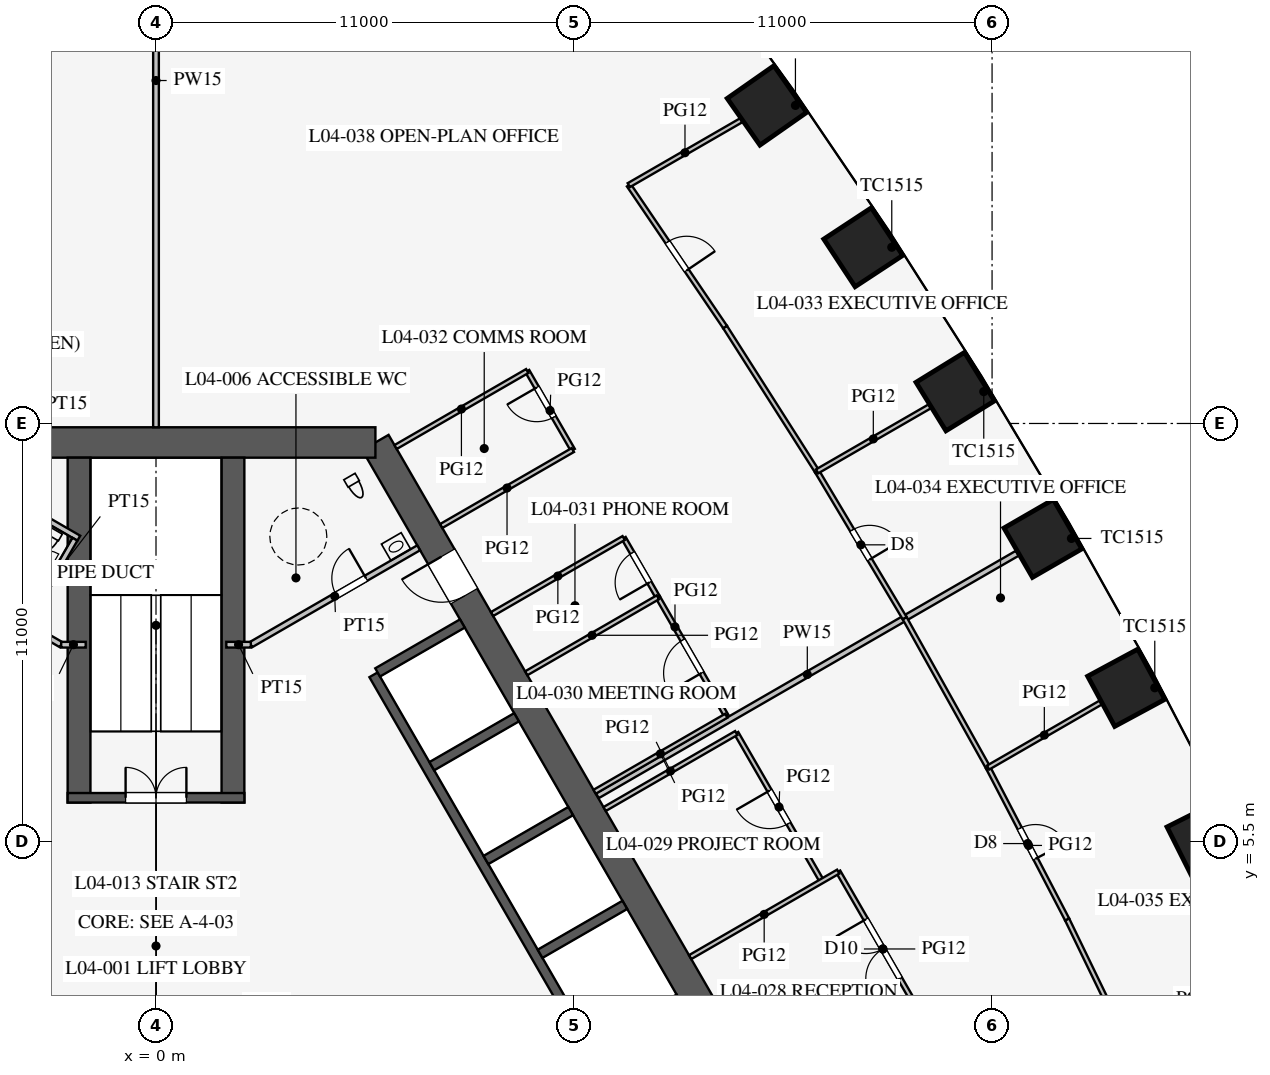
"""IFC4 building model, lengths in metres.
Left out: names, types, materials, properties, quantities, classifications, styles, units other than length and angle.
Written with IfcOpenShell. Run it as: python <this file> out.ifc"""

import sys

from ifc_helpers import new_model, si_unit, direction, frame, frame_2d, origin, origin_2d, place, context, subcontext, project, spatial, rectangle, extrude, element, fill, save


model = new_model("IFC4")
c1 = context("Model", 3, precision=1e-05, world=origin(), true_north=direction((0.0, 1.0)))
c2 = subcontext(c1, "Body", "Model", "MODEL_VIEW")
j1 = project(units=[si_unit("LENGTHUNIT", "METRE"), si_unit("PLANEANGLEUNIT", "RADIAN")], contexts=[c1])
p1 = place(None, origin())
s1 = spatial("IfcSite", under=j1, at=p1, CompositionType="ELEMENT")
p2 = place(p1, origin())
s2 = spatial("IfcBuilding", under=s1, at=p2, CompositionType="ELEMENT")
p3 = place(p2, frame((0.0, 0.0, 20.7)))
s3 = spatial("IfcBuildingStorey", under=s2, at=p3, CompositionType="ELEMENT", Elevation=20.7)
for number, where, z_axis, x_axis in (
    (1, (27.611, 5.549, 0.0), (0.0, 0.0, 1.0), (-0.449, 0.894, 0.0)),
    (2, (25.531, 9.544, 0.0), (0.0, 0.0, 1.0), (-0.475, 0.88, 0.0)),
    (3, (23.338, 13.474, 0.0), (0.0, 0.0, 1.0), (-0.5, 0.866, 0.0)),
    (4, (21.031, 17.339, 0.0), (0.0, 0.0, 1.0), (-0.525, 0.851, 0.0)),
    (5, (18.611, 21.137, 0.0), (0.0, 0.0, 1.0), (-0.549, 0.836, 0.0)),
    (6, (16.076, 24.87, 0.0), (0.0, 0.0, 1.0), (-0.574, 0.819, 0.0)),
):
    element("IfcColumn", number, at=place(p3, frame(where, z_axis=z_axis, x_axis=x_axis)), inside=s3, PredefinedType="COLUMN", context=c2, shape_type="SweptSolid", body=[
        extrude(rectangle(XDim=1.5, YDim=1.5, at=origin_2d()), origin(), (0.0, 0.0, 1.0), 4.2),
    ])
p4 = place(p3, frame((16.743, -3.0, 0.0), z_axis=(0.0, 0.0, 1.0), x_axis=(-0.500002442456, 0.866023993627, 0.0)))
e7 = element("IfcWall", 7, at=p4, inside=s3, PredefinedType="SHEAR", context=c2, shape_type="SweptSolid", body=[
    extrude(rectangle(XDim=21.939, YDim=0.8, at=frame_2d((10.97, 0.0))), origin(), (0.0, 0.0, 1.0), 4.2),
])
p5 = place(p4, frame((17.27, 0.0, 0.0)))
e8 = element("IfcOpeningElement", 8, at=p5, cuts=e7, PredefinedType="OPENING", context=c2, shape_type="SweptSolid", body=[
    extrude(rectangle(XDim=1.2, YDim=2.1, at=frame_2d((0.6, 1.05))), frame((0.0, 0.41, 0.0), z_axis=(0.0, -1.0, 0.0), x_axis=(1.0, 0.0, 0.0)), (0.0, 0.0, 1.0), 0.82),
])
p6 = place(p4, frame((3.47, 0.0, 0.0)))
e9 = element("IfcOpeningElement", 9, at=p6, cuts=e7, PredefinedType="OPENING", context=c2, shape_type="SweptSolid", body=[
    extrude(rectangle(XDim=1.2, YDim=2.1, at=frame_2d((0.6, 1.05))), frame((0.0, 0.41, 0.0), z_axis=(0.0, -1.0, 0.0), x_axis=(1.0, 0.0, 0.0)), (0.0, 0.0, 1.0), 0.82),
])
p7 = place(p3, frame((5.773, 16.0, 0.0), z_axis=(0.0, 0.0, 1.0), x_axis=(-1.0, 0.0, 0.0)))
e10 = element("IfcWall", 10, at=p7, inside=s3, PredefinedType="SHEAR", context=c2, shape_type="SweptSolid", body=[
    extrude(rectangle(XDim=11.547, YDim=0.8, at=frame_2d((5.773, 0.0))), origin(), (0.0, 0.0, 1.0), 4.2),
])
p8 = place(p3, frame((11.424, 0.014, 0.0), z_axis=(0.0, 0.0, 1.0), x_axis=(-0.500001763848, 0.866024385424, 0.0)))
e11 = element("IfcWall", 11, at=p8, inside=s3, PredefinedType="SHEAR", context=c2, shape_type="SweptSolid", body=[
    extrude(rectangle(XDim=11.4, YDim=0.25, at=frame_2d((5.7, 0.0))), origin(), (0.0, 0.0, 1.0), 4.2),
])
for number, where, z_axis, x_axis in (
    (12, (11.532, 0.076, 0.0), (0.0, 0.0, 1.0), (0.866, 0.5, 0.0)),
    (13, (10.107, 2.544, 0.0), (0.0, 0.0, 1.0), (0.866, 0.5, 0.0)),
    (14, (8.682, 5.012, 0.0), (0.0, 0.0, 1.0), (0.866, 0.5, 0.0)),
    (15, (7.257, 7.481, 0.0), (0.0, 0.0, 1.0), (0.866, 0.5, 0.0)),
):
    element("IfcWall", number, at=place(p3, frame(where, z_axis=z_axis, x_axis=x_axis)), inside=s3, PredefinedType="SHEAR", context=c2, shape_type="SweptSolid", body=[
        extrude(rectangle(XDim=2.575, YDim=0.25, at=frame_2d((1.288, 0.0))), origin(), (0.0, 0.0, 1.0), 4.2),
    ])
p9 = place(p3, frame((5.832, 9.949, 0.0), z_axis=(0.0, 0.0, 1.0), x_axis=(0.866029291668, 0.499993265928, 0.0)))
e16 = element("IfcWall", 16, at=p9, inside=s3, PredefinedType="SHEAR", context=c2, shape_type="SweptSolid", body=[
    extrude(rectangle(XDim=2.575, YDim=0.25, at=frame_2d((1.288, 0.0))), origin(), (0.0, 0.0, 1.0), 4.2),
])
for number, where, z_axis, x_axis in (
    (17, (2.025, 6.525, 0.0), (0.0, 0.0, 1.0), (0.0, 1.0, 0.0)),
    (18, (-2.025, 6.525, 0.0), (0.0, 0.0, 1.0), (0.0, 1.0, 0.0)),
):
    element("IfcWall", number, at=place(p3, frame(where, z_axis=z_axis, x_axis=x_axis)), inside=s3, PredefinedType="SHEAR", context=c2, shape_type="SweptSolid", body=[
        extrude(rectangle(XDim=9.075, YDim=0.6, at=frame_2d((4.538, 0.0))), origin(), (0.0, 0.0, 1.0), 4.2),
    ])
p10 = place(p3, frame((2.325, 6.65, 0.0), z_axis=(0.0, 0.0, 1.0), x_axis=(-1.0, 0.0, 0.0)))
e19 = element("IfcWall", 19, at=p10, inside=s3, PredefinedType="SHEAR", context=c2, shape_type="SweptSolid", body=[
    extrude(rectangle(XDim=4.65, YDim=0.25, at=frame_2d((2.325, 0.0))), origin(), (0.0, 0.0, 1.0), 4.2),
])
p11 = place(p10, frame((1.525, 0.0, 0.0)))
e20 = element("IfcOpeningElement", 20, at=p11, cuts=e19, PredefinedType="OPENING", context=c2, shape_type="SweptSolid", body=[
    extrude(rectangle(XDim=1.6, YDim=2.1, at=frame_2d((0.8, 1.05))), frame((0.0, 0.135, 0.0), z_axis=(0.0, -1.0, 0.0), x_axis=(1.0, 0.0, 0.0)), (0.0, 0.0, 1.0), 0.27),
])
p12 = place(p3, frame((2.495, 10.678, 0.0), z_axis=(0.0, 0.0, 1.0), x_axis=(0.86602216432, 0.500005610874, 0.0)))
e21 = element("IfcWall", 21, at=p12, inside=s3, PredefinedType="PARTITIONING", context=c2, shape_type="SweptSolid", body=[
    extrude(rectangle(XDim=5.1, YDim=0.15, at=frame_2d((2.55, 0.0))), origin(), (0.0, 0.0, 1.0), 4.0),
])
p13 = place(p12, frame((2.6, 0.0, 0.0)))
e22 = element("IfcOpeningElement", 22, at=p13, cuts=e21, PredefinedType="OPENING", context=c2, shape_type="SweptSolid", body=[
    extrude(rectangle(XDim=0.9, YDim=2.1, at=frame_2d((0.45, 1.05))), frame((0.0, 0.085, 0.0), z_axis=(0.0, -1.0, 0.0), x_axis=(1.0, 0.0, 0.0)), (0.0, 0.0, 1.0), 0.17),
])
p14 = place(p3, frame((-2.495, 10.678, 0.0), z_axis=(0.0, 0.0, 1.0), x_axis=(-0.86602216432, 0.500005610874, 0.0)))
e23 = element("IfcWall", 23, at=p14, inside=s3, PredefinedType="PARTITIONING", context=c2, shape_type="SweptSolid", body=[
    extrude(rectangle(XDim=5.1, YDim=0.15, at=frame_2d((2.55, 0.0))), origin(), (0.0, 0.0, 1.0), 4.0),
])
p15 = place(p14, frame((2.6, 0.0, 0.0)))
e24 = element("IfcOpeningElement", 24, at=p15, cuts=e23, PredefinedType="OPENING", context=c2, shape_type="SweptSolid", body=[
    extrude(rectangle(XDim=0.9, YDim=2.1, at=frame_2d((0.45, 1.05))), frame((0.0, 0.085, 0.0), z_axis=(0.0, -1.0, 0.0), x_axis=(1.0, 0.0, 0.0)), (0.0, 0.0, 1.0), 0.17),
])
for number, where, z_axis, x_axis in (
    (25, (2.495, 10.678, 0.0), (0.0, 0.0, 1.0), (-1.0, 0.0, 0.0)),
    (26, (-2.495, 10.678, 0.0), (0.0, 0.0, 1.0), (1.0, 0.0, 0.0)),
):
    element("IfcWall", number, at=place(p3, frame(where, z_axis=z_axis, x_axis=x_axis)), inside=s3, PredefinedType="PARTITIONING", context=c2, shape_type="SweptSolid", body=[
        extrude(rectangle(XDim=0.645, YDim=0.15, at=frame_2d((0.323, 0.0))), origin(), (0.0, 0.0, 1.0), 4.0),
    ])
p16 = place(p3, frame((-2.031, 13.482, 0.0), z_axis=(0.0, 0.0, 1.0), x_axis=(-0.866050731258, 0.499956128963, 0.0)))
e27 = element("IfcWall", 27, at=p16, inside=s3, PredefinedType="PARTITIONING", context=c2, shape_type="SweptSolid", body=[
    extrude(rectangle(XDim=4.1, YDim=0.15, at=frame_2d((2.05, 0.0))), origin(), (0.0, 0.0, 1.0), 4.0),
])
p17 = place(p3, frame((-3.389, 11.281, 0.0), z_axis=(0.0, 0.0, 1.0), x_axis=(0.499989096993, 0.866031698547, 0.0)))
e28 = element("IfcWall", 28, at=p17, inside=s3, PredefinedType="PARTITIONING", context=c2, shape_type="SweptSolid", body=[
    extrude(rectangle(XDim=2.51, YDim=0.15, at=frame_2d((1.255, 0.0))), origin(), (0.0, 0.0, 1.0), 4.0),
])
p18 = place(p3, frame((0.0, 16.4, 0.0), z_axis=(0.0, 0.0, 1.0), x_axis=(0.0, 1.0, 0.0)))
e29 = element("IfcWall", 29, at=p18, inside=s3, PredefinedType="PARTITIONING", context=c2, shape_type="SweptSolid", body=[
    extrude(rectangle(XDim=18.25, YDim=0.15, at=frame_2d((9.125, 0.0))), origin(), (0.0, 0.0, 1.0), 2.3),
])
p19 = place(p3, frame((11.613, 6.705, 0.0), z_axis=(0.0, 0.0, 1.0), x_axis=(0.86602785495, 0.499995754432, 0.0)))
e30 = element("IfcWall", 30, at=p19, inside=s3, PredefinedType="PARTITIONING", context=c2, shape_type="SweptSolid", body=[
    extrude(rectangle(XDim=12.759, YDim=0.15, at=frame_2d((6.379, 0.0))), origin(), (0.0, 0.0, 1.0), 3.2),
])
p20 = place(p3, frame((15.006, 8.808, 0.0), z_axis=(0.0, 0.0, 1.0), x_axis=(-0.500012057535, 0.866018442252, 0.0)))
e31 = element("IfcWall", 31, at=p20, inside=s3, PredefinedType="PARTITIONING", context=c2, shape_type="SweptSolid", body=[
    extrude(rectangle(XDim=3.6, YDim=0.12, at=frame_2d((1.8, 0.0))), origin(), (0.0, 0.0, 1.0), 2.9),
])
p21 = place(p20, frame((1.3, 0.0, 0.15)))
e32 = element("IfcOpeningElement", 32, at=p21, cuts=e31, PredefinedType="OPENING", context=c2, shape_type="SweptSolid", body=[
    extrude(rectangle(XDim=1.0, YDim=2.1, at=frame_2d((0.5, 1.05))), frame((0.0, 0.07, 0.0), z_axis=(0.0, -1.0, 0.0), x_axis=(1.0, 0.0, 0.0)), (0.0, 0.0, 1.0), 0.14),
])
p22 = place(p3, frame((13.206, 11.926, 0.0), z_axis=(0.0, 0.0, 1.0), x_axis=(-0.499961193289, 0.866047807691, 0.0)))
e33 = element("IfcWall", 33, at=p22, inside=s3, PredefinedType="PARTITIONING", context=c2, shape_type="SweptSolid", body=[
    extrude(rectangle(XDim=1.8, YDim=0.12, at=frame_2d((0.9, 0.0))), origin(), (0.0, 0.0, 1.0), 2.9),
])
p23 = place(p22, frame((0.45, 0.0, 0.15)))
e34 = element("IfcOpeningElement", 34, at=p23, cuts=e33, PredefinedType="OPENING", context=c2, shape_type="SweptSolid", body=[
    extrude(rectangle(XDim=0.9, YDim=2.1, at=frame_2d((0.45, 1.05))), frame((0.0, 0.07, 0.0), z_axis=(0.0, -1.0, 0.0), x_axis=(1.0, 0.0, 0.0)), (0.0, 0.0, 1.0), 0.14),
])
p24 = place(p3, frame((10.969, 15.802, 0.0), z_axis=(0.0, 0.0, 1.0), x_axis=(-0.500001309137, 0.866024647952, 0.0)))
e35 = element("IfcWall", 35, at=p24, inside=s3, PredefinedType="PARTITIONING", context=c2, shape_type="SweptSolid", body=[
    extrude(rectangle(XDim=2.4, YDim=0.12, at=frame_2d((1.2, 0.0))), origin(), (0.0, 0.0, 1.0), 2.9),
])
p25 = place(p24, frame((1.0, 0.0, 0.15)))
e36 = element("IfcOpeningElement", 36, at=p25, cuts=e35, PredefinedType="OPENING", context=c2, shape_type="SweptSolid", body=[
    extrude(rectangle(XDim=0.9, YDim=2.1, at=frame_2d((0.45, 1.05))), frame((0.0, 0.07, 0.0), z_axis=(0.0, -1.0, 0.0), x_axis=(1.0, 0.0, 0.0)), (0.0, 0.0, 1.0), 0.14),
])
p26 = place(p3, frame((17.519, 4.457, 0.0), z_axis=(0.0, 0.0, 1.0), x_axis=(-0.500013631625, 0.866017533419, 0.0)))
e37 = element("IfcWall", 37, at=p26, inside=s3, PredefinedType="PARTITIONING", context=c2, shape_type="SweptSolid", body=[
    extrude(rectangle(XDim=4.5, YDim=0.12, at=frame_2d((2.25, 0.0))), origin(), (0.0, 0.0, 1.0), 2.9),
])
p27 = place(p26, frame((1.75, 0.0, 0.15)))
e38 = element("IfcOpeningElement", 38, at=p27, cuts=e37, PredefinedType="OPENING", context=c2, shape_type="SweptSolid", body=[
    extrude(rectangle(XDim=1.0, YDim=2.1, at=frame_2d((0.5, 1.05))), frame((0.0, 0.07, 0.0), z_axis=(0.0, -1.0, 0.0), x_axis=(1.0, 0.0, 0.0)), (0.0, 0.0, 1.0), 0.14),
])
p28 = place(p3, frame((20.302, 0.636, 0.0), z_axis=(0.0, 0.0, 1.0), x_axis=(-0.499977259774, 0.866038532462, 0.0)))
e39 = element("IfcWall", 39, at=p28, inside=s3, PredefinedType="PARTITIONING", context=c2, shape_type="SweptSolid", body=[
    extrude(rectangle(XDim=4.7, YDim=0.12, at=frame_2d((2.35, 0.0))), origin(), (0.0, 0.0, 1.0), 2.9),
])
p29 = place(p28, frame((1.45, 0.0, 0.15)))
e40 = element("IfcOpeningElement", 40, at=p29, cuts=e39, PredefinedType="OPENING", context=c2, shape_type="SweptSolid", body=[
    extrude(rectangle(XDim=1.8, YDim=2.1, at=frame_2d((0.9, 1.05))), frame((0.0, 0.07, 0.0), z_axis=(0.0, -1.0, 0.0), x_axis=(1.0, 0.0, 0.0)), (0.0, 0.0, 1.0), 0.14),
])
for number, where, z_axis, x_axis in (
    (41, (11.542, 6.808, 0.0), (0.0, 0.0, 1.0), (0.866, 0.5, 0.0)),
    (42, (6.305, 15.88, 0.0), (0.0, 0.0, 1.0), (0.866, 0.5, 0.0)),
    (43, (9.742, 9.926, 0.0), (0.0, 0.0, 1.0), (0.866, 0.5, 0.0)),
    (44, (8.842, 11.485, 0.0), (0.0, 0.0, 1.0), (0.866, 0.5, 0.0)),
    (45, (7.505, 13.802, 0.0), (0.0, 0.0, 1.0), (0.866, 0.5, 0.0)),
    (46, (11.805, 6.354, 0.0), (0.0, 0.0, 1.0), (0.866, 0.5, 0.0)),
):
    element("IfcWall", number, at=place(p3, frame(where, z_axis=z_axis, x_axis=x_axis)), inside=s3, PredefinedType="PARTITIONING", context=c2, shape_type="SweptSolid", body=[
        extrude(rectangle(XDim=4.0, YDim=0.12, at=frame_2d((2.0, 0.0))), origin(), (0.0, 0.0, 1.0), 2.9),
    ])
p30 = place(p3, frame((14.055, 2.457, 0.0), z_axis=(0.0, 0.0, 1.0), x_axis=(0.866031096941, 0.499990139034, 0.0)))
e47 = element("IfcWall", 47, at=p30, inside=s3, PredefinedType="PARTITIONING", context=c2, shape_type="SweptSolid", body=[
    extrude(rectangle(XDim=4.5, YDim=0.12, at=frame_2d((2.25, 0.0))), origin(), (0.0, 0.0, 1.0), 2.9),
])
p31 = place(p3, frame((19.701, 11.374, 0.0), z_axis=(0.0, 0.0, 1.0), x_axis=(-0.512483962191, 0.858696796604, 0.0)))
e48 = element("IfcWall", 48, at=p31, inside=s3, PredefinedType="PARTITIONING", context=c2, shape_type="SweptSolid", body=[
    extrude(rectangle(XDim=4.5, YDim=0.12, at=frame_2d((2.25, 0.0))), origin(), (0.0, 0.0, 1.0), 2.9),
])
p32 = place(p31, frame((1.8, 0.0, 0.15)))
e49 = element("IfcOpeningElement", 49, at=p32, cuts=e48, PredefinedType="OPENING", context=c2, shape_type="SweptSolid", body=[
    extrude(rectangle(XDim=0.9, YDim=2.1, at=frame_2d((0.45, 1.05))), frame((0.0, 0.07, 0.0), z_axis=(0.0, -1.0, 0.0), x_axis=(1.0, 0.0, 0.0)), (0.0, 0.0, 1.0), 0.14),
])
p33 = place(p3, frame((17.395, 15.239, 0.0), z_axis=(0.0, 0.0, 1.0), x_axis=(-0.537243691336, 0.843427066272, 0.0)))
e50 = element("IfcWall", 50, at=p33, inside=s3, PredefinedType="PARTITIONING", context=c2, shape_type="SweptSolid", body=[
    extrude(rectangle(XDim=4.504, YDim=0.12, at=frame_2d((2.252, 0.0))), origin(), (0.0, 0.0, 1.0), 2.9),
])
p34 = place(p3, frame((14.975, 19.038, 0.0), z_axis=(0.0, 0.0, 1.0), x_axis=(-0.561512004239, 0.827468591002, 0.0)))
e51 = element("IfcWall", 51, at=p34, inside=s3, PredefinedType="PARTITIONING", context=c2, shape_type="SweptSolid", body=[
    extrude(rectangle(XDim=4.512, YDim=0.12, at=frame_2d((2.256, 0.0))), origin(), (0.0, 0.0, 1.0), 2.9),
])
p35 = place(p34, frame((1.8, 0.0, 0.15)))
e52 = element("IfcOpeningElement", 52, at=p35, cuts=e51, PredefinedType="OPENING", context=c2, shape_type="SweptSolid", body=[
    extrude(rectangle(XDim=0.9, YDim=2.1, at=frame_2d((0.45, 1.05))), frame((0.0, 0.07, 0.0), z_axis=(0.0, -1.0, 0.0), x_axis=(1.0, 0.0, 0.0)), (0.0, 0.0, 1.0), 0.14),
])
p36 = place(p3, frame((25.941, -0.611, 0.0), z_axis=(0.0, 0.0, 1.0), x_axis=(-0.435857917556, 0.900015486369, 0.0)))
e53 = element("IfcWall", 53, at=p36, inside=s3, PredefinedType="PARTITIONING", context=c2, shape_type="SweptSolid", body=[
    extrude(rectangle(XDim=4.512, YDim=0.12, at=frame_2d((2.256, 0.0))), origin(), (0.0, 0.0, 1.0), 2.9),
])
p37 = place(p3, frame((21.895, 7.445, 0.0), z_axis=(0.0, 0.0, 1.0), x_axis=(-0.487415216275, 0.87317031955, 0.0)))
e54 = element("IfcWall", 54, at=p37, inside=s3, PredefinedType="PARTITIONING", context=c2, shape_type="SweptSolid", body=[
    extrude(rectangle(XDim=4.5, YDim=0.12, at=frame_2d((2.25, 0.0))), origin(), (0.0, 0.0, 1.0), 2.9),
])
p38 = place(p3, frame((23.975, 3.449, 0.0), z_axis=(0.0, 0.0, 1.0), x_axis=(-0.461810056307, 0.886978845235, 0.0)))
e55 = element("IfcWall", 55, at=p38, inside=s3, PredefinedType="PARTITIONING", context=c2, shape_type="SweptSolid", body=[
    extrude(rectangle(XDim=4.504, YDim=0.12, at=frame_2d((2.252, 0.0))), origin(), (0.0, 0.0, 1.0), 2.9),
])
p39 = place(p38, frame((1.8, 0.0, 0.15)))
e56 = element("IfcOpeningElement", 56, at=p39, cuts=e55, PredefinedType="OPENING", context=c2, shape_type="SweptSolid", body=[
    extrude(rectangle(XDim=0.9, YDim=2.1, at=frame_2d((0.45, 1.05))), frame((0.0, 0.07, 0.0), z_axis=(0.0, -1.0, 0.0), x_axis=(1.0, 0.0, 0.0)), (0.0, 0.0, 1.0), 0.14),
])
p40 = place(p3, frame((12.441, 22.771, 0.0), z_axis=(0.0, 0.0, 1.0), x_axis=(0.866016478054, 0.500015459501, 0.0)))
e57 = element("IfcWall", 57, at=p40, inside=s3, PredefinedType="PARTITIONING", context=c2, shape_type="SweptSolid", body=[
    extrude(rectangle(XDim=3.414, YDim=0.12, at=frame_2d((1.707, 0.0))), origin(), (0.0, 0.0, 1.0), 2.9),
])
for number, where, z_axis, x_axis in (
    (58, (17.395, 15.239, 0.0), (0.0, 0.0, 1.0), (0.866, 0.5, 0.0)),
    (59, (21.895, 7.445, 0.0), (0.0, 0.0, 1.0), (0.866, 0.5, 0.0)),
):
    element("IfcWall", number, at=place(p3, frame(where, z_axis=z_axis, x_axis=x_axis)), inside=s3, PredefinedType="PARTITIONING", context=c2, shape_type="SweptSolid", body=[
        extrude(rectangle(XDim=3.419, YDim=0.12, at=frame_2d((1.71, 0.0))), origin(), (0.0, 0.0, 1.0), 2.9),
    ])
p41 = place(p13, origin())
e60 = element("IfcDoor", 60, at=p41, inside=s3, OperationType="SINGLE_SWING_RIGHT", PredefinedType="DOOR", context=c2, shape_type="SweptSolid", body=[
    extrude(rectangle(XDim=0.9, YDim=2.1, at=frame_2d((0.45, 1.05))), frame((0.0, 0.025, 0.0), z_axis=(0.0, -1.0, 0.0), x_axis=(1.0, 0.0, 0.0)), (0.0, 0.0, 1.0), 0.05),
])
fill(e22, e60)
p42 = place(p11, frame((1.6, 0.0, 0.0), z_axis=(0.0, 0.0, 1.0), x_axis=(-1.0, 0.0, 0.0)))
e61 = element("IfcDoor", 61, at=p42, inside=s3, OperationType="DOUBLE_DOOR_SINGLE_SWING", PredefinedType="DOOR", context=c2, shape_type="SweptSolid", body=[
    extrude(rectangle(XDim=1.6, YDim=2.1, at=frame_2d((0.8, 1.05))), frame((0.0, 0.025, 0.0), z_axis=(0.0, -1.0, 0.0), x_axis=(1.0, 0.0, 0.0)), (0.0, 0.0, 1.0), 0.05),
])
fill(e20, e61)
p43 = place(p5, origin())
e62 = element("IfcDoor", 62, at=p43, inside=s3, OperationType="SINGLE_SWING_RIGHT", PredefinedType="DOOR", context=c2, shape_type="SweptSolid", body=[
    extrude(rectangle(XDim=1.2, YDim=2.1, at=frame_2d((0.6, 1.05))), frame((0.0, 0.025, 0.0), z_axis=(0.0, -1.0, 0.0), x_axis=(1.0, 0.0, 0.0)), (0.0, 0.0, 1.0), 0.05),
])
fill(e8, e62)
p44 = place(p29, origin())
e63 = element("IfcDoor", 63, at=p44, inside=s3, OperationType="DOUBLE_DOOR_SINGLE_SWING", PredefinedType="DOOR", context=c2, shape_type="SweptSolid", body=[
    extrude(rectangle(XDim=1.8, YDim=2.1, at=frame_2d((0.9, 1.05))), frame((0.0, 0.025, 0.0), z_axis=(0.0, -1.0, 0.0), x_axis=(1.0, 0.0, 0.0)), (0.0, 0.0, 1.0), 0.05),
])
fill(e40, e63)
p45 = place(p27, origin())
e64 = element("IfcDoor", 64, at=p45, inside=s3, OperationType="SINGLE_SWING_RIGHT", PredefinedType="DOOR", context=c2, shape_type="SweptSolid", body=[
    extrude(rectangle(XDim=1.0, YDim=2.1, at=frame_2d((0.5, 1.05))), frame((0.0, 0.025, 0.0), z_axis=(0.0, -1.0, 0.0), x_axis=(1.0, 0.0, 0.0)), (0.0, 0.0, 1.0), 0.05),
])
fill(e38, e64)
p46 = place(p21, origin())
e65 = element("IfcDoor", 65, at=p46, inside=s3, OperationType="SINGLE_SWING_LEFT", PredefinedType="DOOR", context=c2, shape_type="SweptSolid", body=[
    extrude(rectangle(XDim=1.0, YDim=2.1, at=frame_2d((0.5, 1.05))), frame((0.0, 0.025, 0.0), z_axis=(0.0, -1.0, 0.0), x_axis=(1.0, 0.0, 0.0)), (0.0, 0.0, 1.0), 0.05),
])
fill(e32, e65)
p47 = place(p23, origin())
e66 = element("IfcDoor", 66, at=p47, inside=s3, OperationType="SINGLE_SWING_LEFT", PredefinedType="DOOR", context=c2, shape_type="SweptSolid", body=[
    extrude(rectangle(XDim=0.9, YDim=2.1, at=frame_2d((0.45, 1.05))), frame((0.0, 0.025, 0.0), z_axis=(0.0, -1.0, 0.0), x_axis=(1.0, 0.0, 0.0)), (0.0, 0.0, 1.0), 0.05),
])
fill(e34, e66)
p48 = place(p25, origin())
e67 = element("IfcDoor", 67, at=p48, inside=s3, OperationType="SINGLE_SWING_RIGHT", PredefinedType="DOOR", context=c2, shape_type="SweptSolid", body=[
    extrude(rectangle(XDim=0.9, YDim=2.1, at=frame_2d((0.45, 1.05))), frame((0.0, 0.025, 0.0), z_axis=(0.0, -1.0, 0.0), x_axis=(1.0, 0.0, 0.0)), (0.0, 0.0, 1.0), 0.05),
])
fill(e36, e67)
p49 = place(p35, frame((0.9, 0.0, 0.0), z_axis=(0.0, 0.0, 1.0), x_axis=(-1.0, 0.0, 0.0)))
e68 = element("IfcDoor", 68, at=p49, inside=s3, OperationType="SINGLE_SWING_RIGHT", PredefinedType="DOOR", context=c2, shape_type="SweptSolid", body=[
    extrude(rectangle(XDim=0.9, YDim=2.1, at=frame_2d((0.45, 1.05))), frame((0.0, 0.025, 0.0), z_axis=(0.0, -1.0, 0.0), x_axis=(1.0, 0.0, 0.0)), (0.0, 0.0, 1.0), 0.05),
])
fill(e52, e68)
p50 = place(p32, frame((0.9, 0.0, 0.0), z_axis=(0.0, 0.0, 1.0), x_axis=(-1.0, 0.0, 0.0)))
e69 = element("IfcDoor", 69, at=p50, inside=s3, OperationType="SINGLE_SWING_RIGHT", PredefinedType="DOOR", context=c2, shape_type="SweptSolid", body=[
    extrude(rectangle(XDim=0.9, YDim=2.1, at=frame_2d((0.45, 1.05))), frame((0.0, 0.025, 0.0), z_axis=(0.0, -1.0, 0.0), x_axis=(1.0, 0.0, 0.0)), (0.0, 0.0, 1.0), 0.05),
])
fill(e49, e69)
p51 = place(p39, frame((0.9, 0.0, 0.0), z_axis=(0.0, 0.0, 1.0), x_axis=(-1.0, 0.0, 0.0)))
e70 = element("IfcDoor", 70, at=p51, inside=s3, OperationType="SINGLE_SWING_RIGHT", PredefinedType="DOOR", context=c2, shape_type="SweptSolid", body=[
    extrude(rectangle(XDim=0.9, YDim=2.1, at=frame_2d((0.45, 1.05))), frame((0.0, 0.025, 0.0), z_axis=(0.0, -1.0, 0.0), x_axis=(1.0, 0.0, 0.0)), (0.0, 0.0, 1.0), 0.05),
])
fill(e56, e70)
save(model, sys.argv[1])
